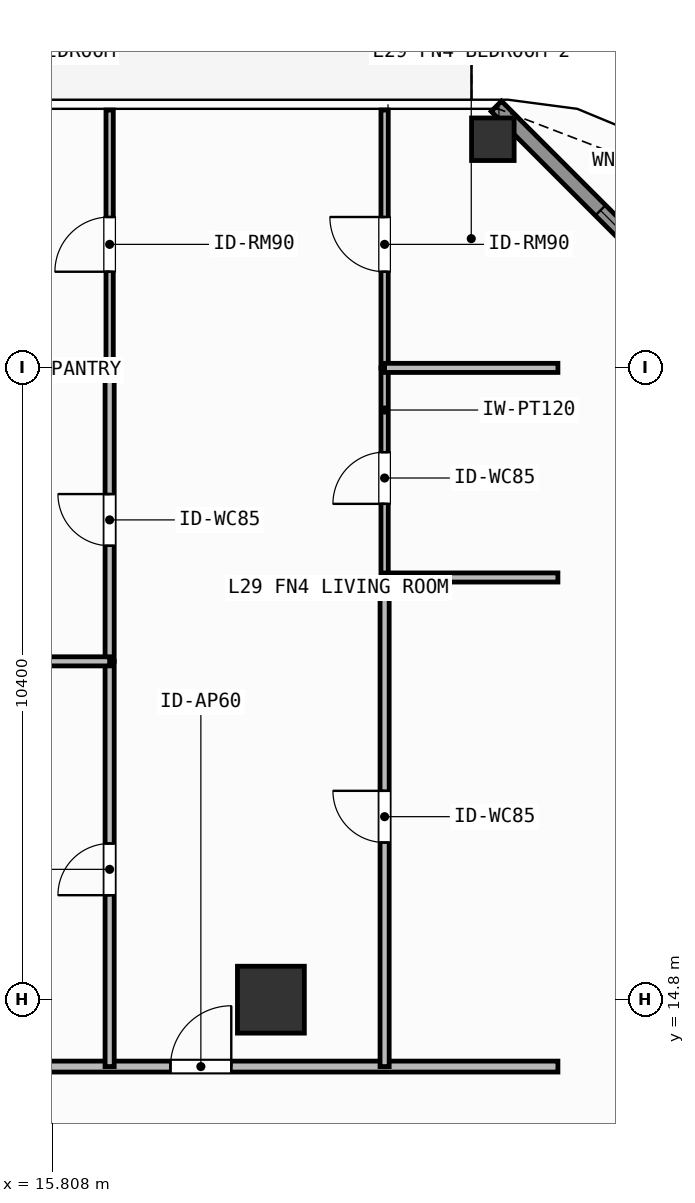
"""IFC4 building model, lengths in metres.
Left out: names, types, materials, properties, quantities, classifications, styles, units other than length and angle.
Written with IfcOpenShell. Run it as: python <this file> out.ifc"""

import sys

from ifc_helpers import new_model, si_unit, direction, frame, frame_2d, origin, origin_2d, place, context, subcontext, project, spatial, rectangle, hollow_rectangle, extrude, element, fill, save


model = new_model("IFC4")
c1 = context("Model", 3, precision=1e-05, world=origin(), true_north=direction((0.0, 1.0)))
c2 = subcontext(c1, "Body", "Model", "MODEL_VIEW")
j1 = project(units=[si_unit("LENGTHUNIT", "METRE"), si_unit("PLANEANGLEUNIT", "RADIAN")], contexts=[c1])
p1 = place(None, origin())
s1 = spatial("IfcSite", under=j1, at=p1, CompositionType="ELEMENT")
p2 = place(p1, origin())
s2 = spatial("IfcBuilding", under=s1, at=p2, CompositionType="ELEMENT")
p3 = place(p2, frame((0.0, 0.0, 117.3)))
s3 = spatial("IfcBuildingStorey", under=s2, at=p3, CompositionType="ELEMENT", Elevation=117.3)
p4 = place(p3, frame((19.4, 14.8, 0.0), z_axis=(0.0, 0.0, 1.0), x_axis=(1.0, 0.0, 0.0)))
e1 = element("IfcColumn", 1, at=p4, inside=s3, PredefinedType="COLUMN", context=c2, shape_type="SweptSolid", body=[
    extrude(rectangle(XDim=1.1, YDim=1.1, at=origin_2d()), origin(), (0.0, 0.0, 1.0), 3.9),
])
p5 = place(p3, frame((23.05, 28.95, 0.0), z_axis=(0.0, 0.0, 1.0), x_axis=(1.0, 0.0, 0.0)))
e2 = element("IfcColumn", 2, at=p5, inside=s3, PredefinedType="COLUMN", context=c2, shape_type="SweptSolid", body=[
    extrude(hollow_rectangle(XDim=0.7, YDim=0.7, WallThickness=0.032, at=origin_2d()), origin(), (0.0, 0.0, 1.0), 3.9),
])
p6 = place(p3, frame((23.108, 29.492, 0.0), z_axis=(0.0, 0.0, 1.0), x_axis=(0.707087534163, -0.707126027686, 0.0)))
e3 = element("IfcWall", 3, at=p6, inside=s3, PredefinedType="SOLIDWALL", context=c2, shape_type="SweptSolid", body=[
    extrude(rectangle(XDim=6.342, YDim=0.24, at=frame_2d((3.171, 0.0))), origin(), (0.0, 0.0, 1.0), 3.68),
])
p7 = place(p6, frame((2.421, 0.0, 0.8)))
e4 = element("IfcOpeningElement", 4, at=p7, cuts=e3, PredefinedType="OPENING", context=c2, shape_type="SweptSolid", body=[
    extrude(rectangle(XDim=1.5, YDim=1.85, at=frame_2d((0.75, 0.925))), frame((0.0, 0.13, 0.0), z_axis=(0.0, -1.0, 0.0), x_axis=(1.0, 0.0, 0.0)), (0.0, 0.0, 1.0), 0.26),
])
p8 = place(p3, frame((12.736, 13.7, 0.0), z_axis=(0.0, 0.0, 1.0), x_axis=(1.0, 0.0, 0.0)))
e5 = element("IfcWall", 5, at=p8, inside=s3, PredefinedType="PARTITIONING", context=c2, shape_type="SweptSolid", body=[
    extrude(rectangle(XDim=11.384, YDim=0.18, at=frame_2d((5.692, 0.0))), origin(), (0.0, 0.0, 1.0), 3.68),
])
p9 = place(p8, frame((5.012, 0.0, 0.0)))
e6 = element("IfcOpeningElement", 6, at=p9, cuts=e5, PredefinedType="OPENING", context=c2, shape_type="SweptSolid", body=[
    extrude(rectangle(XDim=1.0, YDim=2.2, at=frame_2d((0.5, 1.1))), frame((0.0, 0.1, 0.0), z_axis=(0.0, -1.0, 0.0), x_axis=(1.0, 0.0, 0.0)), (0.0, 0.0, 1.0), 0.2),
])
p10 = place(p3, frame((16.748, 13.7, 0.0), z_axis=(0.0, 0.0, 1.0), x_axis=(0.0, 1.0, 0.0)))
e7 = element("IfcWall", 7, at=p10, inside=s3, PredefinedType="PARTITIONING", context=c2, shape_type="SweptSolid", body=[
    extrude(rectangle(XDim=6.664, YDim=0.15, at=frame_2d((3.332, 0.0))), origin(), (0.0, 0.0, 1.0), 3.68),
])
p11 = place(p10, frame((2.818, 0.0, 0.0)))
e8 = element("IfcOpeningElement", 8, at=p11, cuts=e7, PredefinedType="OPENING", context=c2, shape_type="SweptSolid", body=[
    extrude(rectangle(XDim=0.85, YDim=2.1, at=frame_2d((0.425, 1.05))), frame((0.0, 0.085, 0.0), z_axis=(0.0, -1.0, 0.0), x_axis=(1.0, 0.0, 0.0)), (0.0, 0.0, 1.0), 0.17),
])
p12 = place(p3, frame((16.748, 20.364, 0.0), z_axis=(0.0, 0.0, 1.0), x_axis=(0.0, 1.0, 0.0)))
e9 = element("IfcWall", 9, at=p12, inside=s3, PredefinedType="PARTITIONING", context=c2, shape_type="SweptSolid", body=[
    extrude(rectangle(XDim=4.826, YDim=0.15, at=frame_2d((2.413, 0.0))), origin(), (0.0, 0.0, 1.0), 3.68),
])
p13 = place(p12, frame((1.901, 0.0, 0.0)))
e10 = element("IfcOpeningElement", 10, at=p13, cuts=e9, PredefinedType="OPENING", context=c2, shape_type="SweptSolid", body=[
    extrude(rectangle(XDim=0.85, YDim=2.1, at=frame_2d((0.425, 1.05))), frame((0.0, 0.085, 0.0), z_axis=(0.0, -1.0, 0.0), x_axis=(1.0, 0.0, 0.0)), (0.0, 0.0, 1.0), 0.17),
])
p14 = place(p3, frame((16.748, 25.19, 0.0), z_axis=(0.0, 0.0, 1.0), x_axis=(0.0, 1.0, 0.0)))
e11 = element("IfcWall", 11, at=p14, inside=s3, PredefinedType="PARTITIONING", context=c2, shape_type="SweptSolid", body=[
    extrude(rectangle(XDim=4.24, YDim=0.12, at=frame_2d((2.12, 0.0))), origin(), (0.0, 0.0, 1.0), 3.68),
])
p15 = place(p14, frame((1.581, 0.0, 0.0)))
e12 = element("IfcOpeningElement", 12, at=p15, cuts=e11, PredefinedType="OPENING", context=c2, shape_type="SweptSolid", body=[
    extrude(rectangle(XDim=0.9, YDim=2.1, at=frame_2d((0.45, 1.05))), frame((0.0, 0.07, 0.0), z_axis=(0.0, -1.0, 0.0), x_axis=(1.0, 0.0, 0.0)), (0.0, 0.0, 1.0), 0.14),
])
p16 = place(p3, frame((21.27, 13.7, 0.0), z_axis=(0.0, 0.0, 1.0), x_axis=(0.0, 1.0, 0.0)))
e13 = element("IfcWall", 13, at=p16, inside=s3, PredefinedType="PARTITIONING", context=c2, shape_type="SweptSolid", body=[
    extrude(rectangle(XDim=8.043, YDim=0.15, at=frame_2d((4.021, 0.0))), origin(), (0.0, 0.0, 1.0), 3.68),
])
p17 = place(p16, frame((3.685, 0.0, 0.0)))
e14 = element("IfcOpeningElement", 14, at=p17, cuts=e13, PredefinedType="OPENING", context=c2, shape_type="SweptSolid", body=[
    extrude(rectangle(XDim=0.85, YDim=2.1, at=frame_2d((0.425, 1.05))), frame((0.0, 0.085, 0.0), z_axis=(0.0, -1.0, 0.0), x_axis=(1.0, 0.0, 0.0)), (0.0, 0.0, 1.0), 0.17),
])
p18 = place(p3, frame((21.27, 21.743, 0.0), z_axis=(0.0, 0.0, 1.0), x_axis=(0.0, 1.0, 0.0)))
e15 = element("IfcWall", 15, at=p18, inside=s3, PredefinedType="PARTITIONING", context=c2, shape_type="SweptSolid", body=[
    extrude(rectangle(XDim=3.447, YDim=0.12, at=frame_2d((1.724, 0.0))), origin(), (0.0, 0.0, 1.0), 3.68),
])
p19 = place(p18, frame((1.211, 0.0, 0.0)))
e16 = element("IfcOpeningElement", 16, at=p19, cuts=e15, PredefinedType="OPENING", context=c2, shape_type="SweptSolid", body=[
    extrude(rectangle(XDim=0.85, YDim=2.1, at=frame_2d((0.425, 1.05))), frame((0.0, 0.07, 0.0), z_axis=(0.0, -1.0, 0.0), x_axis=(1.0, 0.0, 0.0)), (0.0, 0.0, 1.0), 0.14),
])
p20 = place(p3, frame((21.27, 25.19, 0.0), z_axis=(0.0, 0.0, 1.0), x_axis=(0.0, 1.0, 0.0)))
e17 = element("IfcWall", 17, at=p20, inside=s3, PredefinedType="PARTITIONING", context=c2, shape_type="SweptSolid", body=[
    extrude(rectangle(XDim=4.24, YDim=0.12, at=frame_2d((2.12, 0.0))), origin(), (0.0, 0.0, 1.0), 3.68),
])
p21 = place(p20, frame((1.581, 0.0, 0.0)))
e18 = element("IfcOpeningElement", 18, at=p21, cuts=e17, PredefinedType="OPENING", context=c2, shape_type="SweptSolid", body=[
    extrude(rectangle(XDim=0.9, YDim=2.1, at=frame_2d((0.45, 1.05))), frame((0.0, 0.07, 0.0), z_axis=(0.0, -1.0, 0.0), x_axis=(1.0, 0.0, 0.0)), (0.0, 0.0, 1.0), 0.14),
])
p22 = place(p3, frame((12.736, 20.364, 0.0), z_axis=(0.0, 0.0, 1.0), x_axis=(1.0, 0.0, 0.0)))
e19 = element("IfcWall", 19, at=p22, inside=s3, PredefinedType="PARTITIONING", context=c2, shape_type="SweptSolid", body=[
    extrude(rectangle(XDim=4.012, YDim=0.15, at=frame_2d((2.006, 0.0))), origin(), (0.0, 0.0, 1.0), 3.082),
])
p23 = place(p3, frame((12.736, 25.19, 0.0), z_axis=(0.0, 0.0, 1.0), x_axis=(1.0, 0.0, 0.0)))
e20 = element("IfcWall", 20, at=p23, inside=s3, PredefinedType="PARTITIONING", context=c2, shape_type="SweptSolid", body=[
    extrude(rectangle(XDim=4.012, YDim=0.15, at=frame_2d((2.006, 0.0))), origin(), (0.0, 0.0, 1.0), 3.68),
])
p24 = place(p3, frame((21.27, 21.743, 0.0), z_axis=(0.0, 0.0, 1.0), x_axis=(1.0, 0.0, 0.0)))
e21 = element("IfcWall", 21, at=p24, inside=s3, PredefinedType="PARTITIONING", context=c2, shape_type="SweptSolid", body=[
    extrude(rectangle(XDim=2.85, YDim=0.15, at=frame_2d((1.425, 0.0))), origin(), (0.0, 0.0, 1.0), 3.37),
])
p25 = place(p3, frame((21.27, 25.19, 0.0), z_axis=(0.0, 0.0, 1.0), x_axis=(1.0, 0.0, 0.0)))
e22 = element("IfcWall", 22, at=p25, inside=s3, PredefinedType="PARTITIONING", context=c2, shape_type="SweptSolid", body=[
    extrude(rectangle(XDim=2.85, YDim=0.15, at=frame_2d((1.425, 0.0))), origin(), (0.0, 0.0, 1.0), 3.68),
])
p26 = place(p7, origin())
e23 = element("IfcWindow", 23, at=p26, inside=s3, PartitioningType="SINGLE_PANEL", PredefinedType="WINDOW", context=c2, shape_type="SweptSolid", body=[
    extrude(rectangle(XDim=1.5, YDim=1.85, at=frame_2d((0.75, 0.925))), frame((0.0, 0.03, 0.0), z_axis=(0.0, -1.0, 0.0), x_axis=(1.0, 0.0, 0.0)), (0.0, 0.0, 1.0), 0.06),
])
fill(e4, e23)
p27 = place(p9, origin())
e24 = element("IfcDoor", 24, at=p27, inside=s3, OperationType="SINGLE_SWING_RIGHT", PredefinedType="DOOR", context=c2, shape_type="SweptSolid", body=[
    extrude(rectangle(XDim=1.0, YDim=2.2, at=frame_2d((0.5, 1.1))), frame((0.0, 0.025, 0.0), z_axis=(0.0, -1.0, 0.0), x_axis=(1.0, 0.0, 0.0)), (0.0, 0.0, 1.0), 0.05),
])
fill(e6, e24)
p28 = place(p11, origin())
e25 = element("IfcDoor", 25, at=p28, inside=s3, OperationType="SINGLE_SWING_LEFT", PredefinedType="DOOR", context=c2, shape_type="SweptSolid", body=[
    extrude(rectangle(XDim=0.85, YDim=2.1, at=frame_2d((0.425, 1.05))), frame((0.0, 0.025, 0.0), z_axis=(0.0, -1.0, 0.0), x_axis=(1.0, 0.0, 0.0)), (0.0, 0.0, 1.0), 0.05),
])
fill(e8, e25)
p29 = place(p13, origin())
e26 = element("IfcDoor", 26, at=p29, inside=s3, OperationType="SINGLE_SWING_RIGHT", PredefinedType="DOOR", context=c2, shape_type="SweptSolid", body=[
    extrude(rectangle(XDim=0.85, YDim=2.1, at=frame_2d((0.425, 1.05))), frame((0.0, 0.025, 0.0), z_axis=(0.0, -1.0, 0.0), x_axis=(1.0, 0.0, 0.0)), (0.0, 0.0, 1.0), 0.05),
])
fill(e10, e26)
p30 = place(p15, origin())
e27 = element("IfcDoor", 27, at=p30, inside=s3, OperationType="SINGLE_SWING_LEFT", PredefinedType="DOOR", context=c2, shape_type="SweptSolid", body=[
    extrude(rectangle(XDim=0.9, YDim=2.1, at=frame_2d((0.45, 1.05))), frame((0.0, 0.025, 0.0), z_axis=(0.0, -1.0, 0.0), x_axis=(1.0, 0.0, 0.0)), (0.0, 0.0, 1.0), 0.05),
])
fill(e12, e27)
p31 = place(p17, origin())
e28 = element("IfcDoor", 28, at=p31, inside=s3, OperationType="SINGLE_SWING_RIGHT", PredefinedType="DOOR", context=c2, shape_type="SweptSolid", body=[
    extrude(rectangle(XDim=0.85, YDim=2.1, at=frame_2d((0.425, 1.05))), frame((0.0, 0.025, 0.0), z_axis=(0.0, -1.0, 0.0), x_axis=(1.0, 0.0, 0.0)), (0.0, 0.0, 1.0), 0.05),
])
fill(e14, e28)
p32 = place(p19, origin())
e29 = element("IfcDoor", 29, at=p32, inside=s3, OperationType="SINGLE_SWING_LEFT", PredefinedType="DOOR", context=c2, shape_type="SweptSolid", body=[
    extrude(rectangle(XDim=0.85, YDim=2.1, at=frame_2d((0.425, 1.05))), frame((0.0, 0.025, 0.0), z_axis=(0.0, -1.0, 0.0), x_axis=(1.0, 0.0, 0.0)), (0.0, 0.0, 1.0), 0.05),
])
fill(e16, e29)
p33 = place(p21, origin())
e30 = element("IfcDoor", 30, at=p33, inside=s3, OperationType="SINGLE_SWING_RIGHT", PredefinedType="DOOR", context=c2, shape_type="SweptSolid", body=[
    extrude(rectangle(XDim=0.9, YDim=2.1, at=frame_2d((0.45, 1.05))), frame((0.0, 0.025, 0.0), z_axis=(0.0, -1.0, 0.0), x_axis=(1.0, 0.0, 0.0)), (0.0, 0.0, 1.0), 0.05),
])
fill(e18, e30)
save(model, sys.argv[1])
